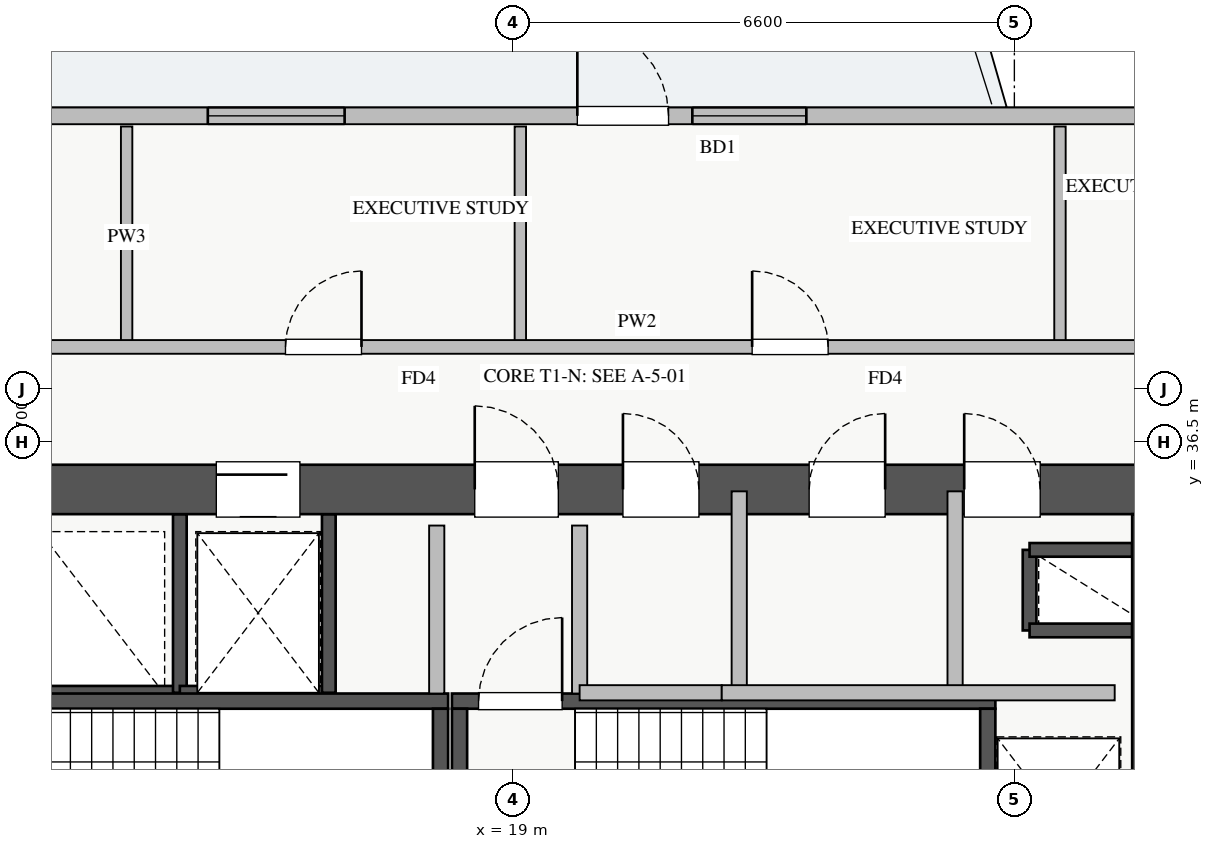
"""IFC4 building model, lengths in metres.
Left out: names, types, materials, properties, quantities, classifications, styles, units other than length and angle.
Written with IfcOpenShell. Run it as: python <this file> out.ifc"""

import sys

from ifc_helpers import new_model, si_unit, direction, frame, frame_2d, origin, place, context, subcontext, project, spatial, rectangle, extrude, source, transform, mapped, element, fill, save


model = new_model("IFC4")
c1 = context("Model", 3, precision=1e-05, world=origin(), true_north=direction((0.0, 1.0)))
c2 = subcontext(c1, "Body", "Model", "MODEL_VIEW")
j1 = project(units=[si_unit("LENGTHUNIT", "METRE"), si_unit("PLANEANGLEUNIT", "RADIAN")], contexts=[c1])
p1 = place(None, origin())
s1 = spatial("IfcSite", under=j1, at=p1, CompositionType="ELEMENT")
p2 = place(p1, origin())
s2 = spatial("IfcBuilding", under=s1, at=p2, CompositionType="ELEMENT")
p3 = place(p2, frame((0.0, 0.0, 119.75)))
s3 = spatial("IfcBuildingStorey", under=s2, at=p3, CompositionType="ELEMENT", Elevation=119.75)
p4 = place(p3, frame((12.68, 33.2, 0.0), z_axis=(0.0, 0.0, 1.0), x_axis=(1.0, 0.0, 0.0)))
e1 = element("IfcWall", 1, at=p4, inside=s3, PredefinedType="SHEAR", context=c2, shape_type="SweptSolid", body=[
    extrude(rectangle(XDim=1.94, YDim=0.18, at=frame_2d((0.97, 0.0))), origin(), (0.0, 0.0, 1.0), 3.07),
])
p5 = place(p3, frame((14.62, 33.2, 0.0), z_axis=(0.0, 0.0, 1.0), x_axis=(0.0, 1.0, 0.0)))
e2 = element("IfcWall", 2, at=p5, inside=s3, PredefinedType="SHEAR", context=c2, shape_type="SweptSolid", body=[
    extrude(rectangle(XDim=2.35, YDim=0.18, at=frame_2d((1.175, 0.0))), origin(), (0.0, 0.0, 1.0), 3.07),
])
p6 = place(p3, frame((25.8, 34.02, 0.0), z_axis=(0.0, 0.0, 1.0), x_axis=(0.0, 1.0, 0.0)))
e3 = element("IfcWall", 3, at=p6, inside=s3, PredefinedType="SHEAR", context=c2, shape_type="SweptSolid", body=[
    extrude(rectangle(XDim=1.06, YDim=0.18, at=frame_2d((0.53, 0.0))), origin(), (0.0, 0.0, 1.0), 3.07),
])
for number, where, z_axis, x_axis in (
    (4, (25.8, 35.08, 0.0), (0.0, 0.0, 1.0), (1.0, 0.0, 0.0)),
    (5, (25.8, 34.02, 0.0), (0.0, 0.0, 1.0), (1.0, 0.0, 0.0)),
):
    element("IfcWall", number, at=place(p3, frame(where, z_axis=z_axis, x_axis=x_axis)), inside=s3, PredefinedType="SHEAR", context=c2, shape_type="SweptSolid", body=[
        extrude(rectangle(XDim=1.35, YDim=0.18, at=frame_2d((0.675, 0.0))), origin(), (0.0, 0.0, 1.0), 3.07),
    ])
p7 = place(p3, frame((14.62, 33.2, 0.0), z_axis=(0.0, 0.0, 1.0), x_axis=(1.0, 0.0, 0.0)))
e6 = element("IfcWall", 6, at=p7, inside=s3, PredefinedType="SHEAR", context=c2, shape_type="SweptSolid", body=[
    extrude(rectangle(XDim=1.96, YDim=0.18, at=frame_2d((0.98, 0.0))), origin(), (0.0, 0.0, 1.0), 3.07),
])
p8 = place(p3, frame((16.58, 33.2, 0.0), z_axis=(0.0, 0.0, 1.0), x_axis=(0.0, 1.0, 0.0)))
e7 = element("IfcWall", 7, at=p8, inside=s3, PredefinedType="SHEAR", context=c2, shape_type="SweptSolid", body=[
    extrude(rectangle(XDim=2.35, YDim=0.18, at=frame_2d((1.175, 0.0))), origin(), (0.0, 0.0, 1.0), 3.07),
])
p9 = place(p3, frame((10.85, 33.09, 0.0), z_axis=(0.0, 0.0, 1.0), x_axis=(1.0, 0.0, 0.0)))
e8 = element("IfcWall", 8, at=p9, inside=s3, PredefinedType="SHEAR", context=c2, shape_type="SweptSolid", body=[
    extrude(rectangle(XDim=7.3, YDim=0.2, at=frame_2d((3.65, 0.0))), origin(), (0.0, 0.0, 1.0), 3.25),
])
p10 = place(p9, frame((0.35, 0.0, 0.0)))
e9 = element("IfcOpeningElement", 9, at=p10, cuts=e8, PredefinedType="OPENING", context=c2, shape_type="SweptSolid", body=[
    extrude(rectangle(XDim=1.1, YDim=2.05, at=frame_2d((0.55, 1.025))), frame((0.0, 0.11, 0.0), z_axis=(0.0, -1.0, 0.0), x_axis=(1.0, 0.0, 0.0)), (0.0, 0.0, 1.0), 0.22),
])
p11 = place(p3, frame((18.05, 30.05, 0.0), z_axis=(0.0, 0.0, 1.0), x_axis=(0.0, 1.0, 0.0)))
e10 = element("IfcWall", 10, at=p11, inside=s3, PredefinedType="SHEAR", context=c2, shape_type="SweptSolid", body=[
    extrude(rectangle(XDim=2.94, YDim=0.2, at=frame_2d((1.47, 0.0))), origin(), (0.0, 0.0, 1.0), 3.25),
])
p12 = place(p3, frame((18.2, 33.09, 0.0), z_axis=(0.0, 0.0, 1.0), x_axis=(1.0, 0.0, 0.0)))
e11 = element("IfcWall", 11, at=p12, inside=s3, PredefinedType="SHEAR", context=c2, shape_type="SweptSolid", body=[
    extrude(rectangle(XDim=7.15, YDim=0.2, at=frame_2d((3.575, 0.0))), origin(), (0.0, 0.0, 1.0), 3.25),
])
p13 = place(p12, frame((0.35, 0.0, 0.0)))
e12 = element("IfcOpeningElement", 12, at=p13, cuts=e11, PredefinedType="OPENING", context=c2, shape_type="SweptSolid", body=[
    extrude(rectangle(XDim=1.1, YDim=2.05, at=frame_2d((0.55, 1.025))), frame((0.0, 0.11, 0.0), z_axis=(0.0, -1.0, 0.0), x_axis=(1.0, 0.0, 0.0)), (0.0, 0.0, 1.0), 0.22),
])
for number, where, z_axis, x_axis in (
    (13, (18.3, 30.05, 0.0), (0.0, 0.0, 1.0), (0.0, 1.0, 0.0)),
    (14, (25.25, 30.05, 0.0), (0.0, 0.0, 1.0), (0.0, 1.0, 0.0)),
):
    element("IfcWall", number, at=place(p3, frame(where, z_axis=z_axis, x_axis=x_axis)), inside=s3, PredefinedType="SHEAR", context=c2, shape_type="SweptSolid", body=[
        extrude(rectangle(XDim=2.94, YDim=0.2, at=frame_2d((1.47, 0.0))), origin(), (0.0, 0.0, 1.0), 3.25),
    ])
p14 = place(p3, frame((10.2, 35.875, 0.0), z_axis=(0.0, 0.0, 1.0), x_axis=(1.0, 0.0, 0.0)))
e15 = element("IfcWall", 15, at=p14, inside=s3, PredefinedType="SHEAR", context=c2, shape_type="SweptSolid", body=[
    extrude(rectangle(XDim=17.6, YDim=0.65, at=frame_2d((8.8, 0.0))), origin(), (0.0, 0.0, 1.0), 3.25),
])
p15 = place(p14, frame((1.15, 0.0, 0.0)))
e16 = element("IfcOpeningElement", 16, at=p15, cuts=e15, PredefinedType="OPENING", context=c2, shape_type="SweptSolid", body=[
    extrude(rectangle(XDim=1.1, YDim=2.05, at=frame_2d((0.55, 1.025))), frame((0.0, 0.335, 0.0), z_axis=(0.0, -1.0, 0.0), x_axis=(1.0, 0.0, 0.0)), (0.0, 0.0, 1.0), 0.67),
])
p16 = place(p14, frame((8.3, 0.0, 0.0)))
e17 = element("IfcOpeningElement", 17, at=p16, cuts=e15, PredefinedType="OPENING", context=c2, shape_type="SweptSolid", body=[
    extrude(rectangle(XDim=1.1, YDim=2.05, at=frame_2d((0.55, 1.025))), frame((0.0, 0.335, 0.0), z_axis=(0.0, -1.0, 0.0), x_axis=(1.0, 0.0, 0.0)), (0.0, 0.0, 1.0), 0.67),
])
p17 = place(p14, frame((4.9, 0.0, 0.0)))
e18 = element("IfcOpeningElement", 18, at=p17, cuts=e15, PredefinedType="OPENING", context=c2, shape_type="SweptSolid", body=[
    extrude(rectangle(XDim=1.1, YDim=2.05, at=frame_2d((0.55, 1.025))), frame((0.0, 0.335, 0.0), z_axis=(0.0, -1.0, 0.0), x_axis=(1.0, 0.0, 0.0)), (0.0, 0.0, 1.0), 0.67),
])
p18 = place(p14, frame((14.74, 0.0, 0.0)))
e19 = element("IfcOpeningElement", 19, at=p18, cuts=e15, PredefinedType="OPENING", context=c2, shape_type="SweptSolid", body=[
    extrude(rectangle(XDim=1.0, YDim=2.05, at=frame_2d((0.5, 1.025))), frame((0.0, 0.335, 0.0), z_axis=(0.0, -1.0, 0.0), x_axis=(1.0, 0.0, 0.0)), (0.0, 0.0, 1.0), 0.67),
])
p19 = place(p14, frame((10.25, 0.0, 0.0)))
e20 = element("IfcOpeningElement", 20, at=p19, cuts=e15, PredefinedType="OPENING", context=c2, shape_type="SweptSolid", body=[
    extrude(rectangle(XDim=1.0, YDim=2.05, at=frame_2d((0.5, 1.025))), frame((0.0, 0.335, 0.0), z_axis=(0.0, -1.0, 0.0), x_axis=(1.0, 0.0, 0.0)), (0.0, 0.0, 1.0), 0.67),
])
p20 = place(p14, frame((12.7, 0.0, 0.0)))
e21 = element("IfcOpeningElement", 21, at=p20, cuts=e15, PredefinedType="OPENING", context=c2, shape_type="SweptSolid", body=[
    extrude(rectangle(XDim=1.0, YDim=2.05, at=frame_2d((0.5, 1.025))), frame((0.0, 0.335, 0.0), z_axis=(0.0, -1.0, 0.0), x_axis=(1.0, 0.0, 0.0)), (0.0, 0.0, 1.0), 0.67),
])
p21 = place(p3, frame((27.475, 29.65, 0.0), z_axis=(0.0, 0.0, 1.0), x_axis=(0.0, 1.0, 0.0)))
e22 = element("IfcWall", 22, at=p21, inside=s3, PredefinedType="SHEAR", context=c2, shape_type="SweptSolid", body=[
    extrude(rectangle(XDim=5.9, YDim=0.65, at=frame_2d((2.95, 0.0))), origin(), (0.0, 0.0, 1.0), 3.25),
])
p22 = place(p21, frame((1.1, 0.0, 0.0)))
e23 = element("IfcOpeningElement", 23, at=p22, cuts=e22, PredefinedType="OPENING", context=c2, shape_type="SweptSolid", body=[
    extrude(rectangle(XDim=1.3, YDim=2.05, at=frame_2d((0.65, 1.025))), frame((0.0, 0.335, 0.0), z_axis=(0.0, -1.0, 0.0), x_axis=(1.0, 0.0, 0.0)), (0.0, 0.0, 1.0), 0.67),
])
p23 = place(p3, frame((6.55, 40.79, 0.0), z_axis=(0.0, 0.0, 1.0), x_axis=(1.0, 0.0, 0.0)))
e24 = element("IfcWall", 24, at=p23, inside=s3, PredefinedType="STANDARD", context=c2, shape_type="SweptSolid", body=[
    extrude(rectangle(XDim=24.9, YDim=0.22, at=frame_2d((12.45, 0.0))), origin(), (0.0, 0.0, 1.0), 2.61),
])
p24 = place(p23, frame((13.3, 0.0, 0.0)))
e25 = element("IfcOpeningElement", 25, at=p24, cuts=e24, PredefinedType="OPENING", context=c2, shape_type="SweptSolid", body=[
    extrude(rectangle(XDim=1.2, YDim=2.1, at=frame_2d((0.6, 1.05))), frame((0.0, 0.12, 0.0), z_axis=(0.0, -1.0, 0.0), x_axis=(1.0, 0.0, 0.0)), (0.0, 0.0, 1.0), 0.24),
])
p25 = place(p23, frame((3.635, 0.0, 0.9)))
e26 = element("IfcOpeningElement", 26, at=p25, cuts=e24, PredefinedType="OPENING", context=c2, shape_type="SweptSolid", body=[
    extrude(rectangle(XDim=2.4, YDim=1.5, at=frame_2d((1.2, 0.75))), frame((0.0, 0.12, 0.0), z_axis=(0.0, -1.0, 0.0), x_axis=(1.0, 0.0, 0.0)), (0.0, 0.0, 1.0), 0.24),
])
p26 = place(p23, frame((8.438, 0.0, 0.9)))
e27 = element("IfcOpeningElement", 27, at=p26, cuts=e24, PredefinedType="OPENING", context=c2, shape_type="SweptSolid", body=[
    extrude(rectangle(XDim=1.8, YDim=1.45, at=frame_2d((0.9, 0.725))), frame((0.0, 0.12, 0.0), z_axis=(0.0, -1.0, 0.0), x_axis=(1.0, 0.0, 0.0)), (0.0, 0.0, 1.0), 0.24),
])
p27 = place(p23, frame((14.813, 0.0, 0.9)))
e28 = element("IfcOpeningElement", 28, at=p27, cuts=e24, PredefinedType="OPENING", context=c2, shape_type="SweptSolid", body=[
    extrude(rectangle(XDim=1.5, YDim=1.45, at=frame_2d((0.75, 0.725))), frame((0.0, 0.12, 0.0), z_axis=(0.0, -1.0, 0.0), x_axis=(1.0, 0.0, 0.0)), (0.0, 0.0, 1.0), 0.24),
])
p28 = place(p23, frame((20.738, 0.0, 0.9)))
e29 = element("IfcOpeningElement", 29, at=p28, cuts=e24, PredefinedType="OPENING", context=c2, shape_type="SweptSolid", body=[
    extrude(rectangle(XDim=2.1, YDim=1.48, at=frame_2d((1.05, 0.74))), frame((0.0, 0.12, 0.0), z_axis=(0.0, -1.0, 0.0), x_axis=(1.0, 0.0, 0.0)), (0.0, 0.0, 1.0), 0.24),
])
p29 = place(p23, frame((0.258, 0.0, 0.9)))
e30 = element("IfcOpeningElement", 30, at=p29, cuts=e24, PredefinedType="OPENING", context=c2, shape_type="SweptSolid", body=[
    extrude(rectangle(XDim=1.8, YDim=1.5, at=frame_2d((0.9, 0.75))), frame((0.0, 0.12, 0.0), z_axis=(0.0, -1.0, 0.0), x_axis=(1.0, 0.0, 0.0)), (0.0, 0.0, 1.0), 0.24),
])
for number, where, z_axis, x_axis in (
    (31, (18.0, 33.19, 0.0), (0.0, 0.0, 1.0), (0.0, 1.0, 0.0)),
    (32, (19.88, 33.19, 0.0), (0.0, 0.0, 1.0), (0.0, 1.0, 0.0)),
):
    element("IfcWall", number, at=place(p3, frame(where, z_axis=z_axis, x_axis=x_axis)), inside=s3, PredefinedType="PARTITIONING", context=c2, shape_type="SweptSolid", body=[
        extrude(rectangle(XDim=2.21, YDim=0.2, at=frame_2d((1.105, 0.0))), origin(), (0.0, 0.0, 1.0), 3.07),
    ])
p30 = place(p3, frame((24.82, 33.2, 0.0), z_axis=(0.0, 0.0, 1.0), x_axis=(0.0, 1.0, 0.0)))
e33 = element("IfcWall", 33, at=p30, inside=s3, PredefinedType="PARTITIONING", context=c2, shape_type="SweptSolid", body=[
    extrude(rectangle(XDim=2.65, YDim=0.2, at=frame_2d((1.325, 0.0))), origin(), (0.0, 0.0, 1.0), 3.07),
])
p31 = place(p3, frame((19.88, 33.2, 0.0), z_axis=(0.0, 0.0, 1.0), x_axis=(1.0, 0.0, 0.0)))
e34 = element("IfcWall", 34, at=p31, inside=s3, PredefinedType="PARTITIONING", context=c2, shape_type="SweptSolid", body=[
    extrude(rectangle(XDim=1.87, YDim=0.2, at=frame_2d((0.935, 0.0))), origin(), (0.0, 0.0, 1.0), 3.07),
])
p32 = place(p3, frame((21.98, 33.2, 0.0), z_axis=(0.0, 0.0, 1.0), x_axis=(0.0, 1.0, 0.0)))
e35 = element("IfcWall", 35, at=p32, inside=s3, PredefinedType="PARTITIONING", context=c2, shape_type="SweptSolid", body=[
    extrude(rectangle(XDim=2.65, YDim=0.2, at=frame_2d((1.325, 0.0))), origin(), (0.0, 0.0, 1.0), 3.07),
])
p33 = place(p3, frame((21.75, 33.2, 0.0), z_axis=(0.0, 0.0, 1.0), x_axis=(1.0, 0.0, 0.0)))
e36 = element("IfcWall", 36, at=p33, inside=s3, PredefinedType="PARTITIONING", context=c2, shape_type="SweptSolid", body=[
    extrude(rectangle(XDim=5.17, YDim=0.2, at=frame_2d((2.585, 0.0))), origin(), (0.0, 0.0, 1.0), 3.07),
])
p34 = place(p3, frame((13.92, 37.75, 0.0), z_axis=(0.0, 0.0, 1.0), x_axis=(0.0, 1.0, 0.0)))
e37 = element("IfcWall", 37, at=p34, inside=s3, PredefinedType="PARTITIONING", context=c2, shape_type="SweptSolid", body=[
    extrude(rectangle(XDim=2.9, YDim=0.15, at=frame_2d((1.45, 0.0))), origin(), (0.0, 0.0, 1.0), 3.07),
])
p35 = place(p3, frame((19.1, 37.75, 0.0), z_axis=(0.0, 0.0, 1.0), x_axis=(0.0, 1.0, 0.0)))
e38 = element("IfcWall", 38, at=p35, inside=s3, PredefinedType="PARTITIONING", context=c2, shape_type="SweptSolid", body=[
    extrude(rectangle(XDim=2.9, YDim=0.15, at=frame_2d((1.45, 0.0))), origin(), (0.0, 0.0, 1.0), 2.821),
])
p36 = place(p3, frame((26.2, 37.75, 0.0), z_axis=(0.0, 0.0, 1.0), x_axis=(0.0, 1.0, 0.0)))
e39 = element("IfcWall", 39, at=p36, inside=s3, PredefinedType="PARTITIONING", context=c2, shape_type="SweptSolid", body=[
    extrude(rectangle(XDim=2.9, YDim=0.15, at=frame_2d((1.45, 0.0))), origin(), (0.0, 0.0, 1.0), 3.07),
])
p37 = place(p3, frame((8.85, 37.75, 0.0), z_axis=(0.0, 0.0, 1.0), x_axis=(1.0, 0.0, 0.0)))
e40 = element("IfcWall", 40, at=p37, inside=s3, PredefinedType="PARTITIONING", context=c2, shape_type="SweptSolid", body=[
    extrude(rectangle(XDim=23.57, YDim=0.18, at=frame_2d((11.785, 0.0))), origin(), (0.0, 0.0, 1.0), 3.07),
])
p38 = place(p37, frame((2.035, 0.0, 0.0)))
e41 = element("IfcOpeningElement", 41, at=p38, cuts=e40, PredefinedType="OPENING", context=c2, shape_type="SweptSolid", body=[
    extrude(rectangle(XDim=1.0, YDim=2.05, at=frame_2d((0.5, 1.025))), frame((0.0, 0.1, 0.0), z_axis=(0.0, -1.0, 0.0), x_axis=(1.0, 0.0, 0.0)), (0.0, 0.0, 1.0), 0.2),
])
p39 = place(p37, frame((7.16, 0.0, 0.0)))
e42 = element("IfcOpeningElement", 42, at=p39, cuts=e40, PredefinedType="OPENING", context=c2, shape_type="SweptSolid", body=[
    extrude(rectangle(XDim=1.0, YDim=2.05, at=frame_2d((0.5, 1.025))), frame((0.0, 0.1, 0.0), z_axis=(0.0, -1.0, 0.0), x_axis=(1.0, 0.0, 0.0)), (0.0, 0.0, 1.0), 0.2),
])
p40 = place(p37, frame((13.3, 0.0, 0.0)))
e43 = element("IfcOpeningElement", 43, at=p40, cuts=e40, PredefinedType="OPENING", context=c2, shape_type="SweptSolid", body=[
    extrude(rectangle(XDim=1.0, YDim=2.05, at=frame_2d((0.5, 1.025))), frame((0.0, 0.1, 0.0), z_axis=(0.0, -1.0, 0.0), x_axis=(1.0, 0.0, 0.0)), (0.0, 0.0, 1.0), 0.2),
])
p41 = place(p37, frame((19.74, 0.0, 0.0)))
e44 = element("IfcOpeningElement", 44, at=p41, cuts=e40, PredefinedType="OPENING", context=c2, shape_type="SweptSolid", body=[
    extrude(rectangle(XDim=1.0, YDim=2.05, at=frame_2d((0.5, 1.025))), frame((0.0, 0.1, 0.0), z_axis=(0.0, -1.0, 0.0), x_axis=(1.0, 0.0, 0.0)), (0.0, 0.0, 1.0), 0.2),
])
m1 = source(origin(), c2, "Body", "SweptSolid", [
    extrude(rectangle(XDim=1.2, YDim=2.1, at=frame_2d((0.6, 1.05))), frame((0.0, 0.025, 0.0), z_axis=(0.0, -1.0, 0.0), x_axis=(1.0, 0.0, 0.0)), (0.0, 0.0, 1.0), 0.05),
])
p42 = place(p24, origin())
e45 = element("IfcDoor", 45, at=p42, inside=s3, OperationType="SINGLE_SWING_LEFT", PredefinedType="DOOR", context=c2, shape_type="MappedRepresentation", body=[
    mapped(m1, transform((0.0, 0.0, 0.0), x_axis=(1.0, 0.0, 0.0), y_axis=(0.0, 1.0, 0.0), z_axis=(0.0, 0.0, 1.0), scale=1.0)),
])
fill(e25, e45)
m2 = source(origin(), c2, "Body", "SweptSolid", [
    extrude(rectangle(XDim=1.8, YDim=1.45, at=frame_2d((0.9, 0.725))), frame((0.0, 0.03, 0.0), z_axis=(0.0, -1.0, 0.0), x_axis=(1.0, 0.0, 0.0)), (0.0, 0.0, 1.0), 0.06),
])
p43 = place(p26, origin())
e46 = element("IfcWindow", 46, at=p43, inside=s3, PartitioningType="DOUBLE_PANEL_VERTICAL", PredefinedType="WINDOW", context=c2, shape_type="MappedRepresentation", body=[
    mapped(m2, transform((0.0, 0.0, 0.0), x_axis=(1.0, 0.0, 0.0), y_axis=(0.0, 1.0, 0.0), z_axis=(0.0, 0.0, 1.0), scale=1.0)),
])
fill(e27, e46)
m3 = source(origin(), c2, "Body", "SweptSolid", [
    extrude(rectangle(XDim=1.5, YDim=1.45, at=frame_2d((0.75, 0.725))), frame((0.0, 0.03, 0.0), z_axis=(0.0, -1.0, 0.0), x_axis=(1.0, 0.0, 0.0)), (0.0, 0.0, 1.0), 0.06),
])
p44 = place(p27, origin())
e47 = element("IfcWindow", 47, at=p44, inside=s3, PartitioningType="DOUBLE_PANEL_VERTICAL", PredefinedType="WINDOW", context=c2, shape_type="MappedRepresentation", body=[
    mapped(m3, transform((0.0, 0.0, 0.0), x_axis=(1.0, 0.0, 0.0), y_axis=(0.0, 1.0, 0.0), z_axis=(0.0, 0.0, 1.0), scale=1.0)),
])
fill(e28, e47)
m4 = source(origin(), c2, "Body", "SweptSolid", [
    extrude(rectangle(XDim=1.1, YDim=2.05, at=frame_2d((0.55, 1.025))), frame((0.0, 0.025, 0.0), z_axis=(0.0, -1.0, 0.0), x_axis=(1.0, 0.0, 0.0)), (0.0, 0.0, 1.0), 0.05),
])
p45 = place(p16, origin())
e48 = element("IfcDoor", 48, at=p45, inside=s3, OperationType="SINGLE_SWING_LEFT", PredefinedType="DOOR", context=c2, shape_type="MappedRepresentation", body=[
    mapped(m4, transform((0.0, 0.0, 0.0), x_axis=(1.0, 0.0, 0.0), y_axis=(0.0, 1.0, 0.0), z_axis=(0.0, 0.0, 1.0), scale=1.0)),
])
fill(e17, e48)
p46 = place(p13, origin())
e49 = element("IfcDoor", 49, at=p46, inside=s3, OperationType="SINGLE_SWING_RIGHT", PredefinedType="DOOR", context=c2, shape_type="MappedRepresentation", body=[
    mapped(m4, transform((0.0, 0.0, 0.0), x_axis=(1.0, 0.0, 0.0), y_axis=(0.0, 1.0, 0.0), z_axis=(0.0, 0.0, 1.0), scale=1.0)),
])
fill(e12, e49)
p47 = place(p17, origin())
e50 = element("IfcDoor", 50, at=p47, inside=s3, OperationType="SLIDING_TO_LEFT", PredefinedType="DOOR", context=c2, shape_type="MappedRepresentation", body=[
    mapped(m4, transform((0.0, 0.0, 0.0), x_axis=(1.0, 0.0, 0.0), y_axis=(0.0, 1.0, 0.0), z_axis=(0.0, 0.0, 1.0), scale=1.0)),
])
fill(e18, e50)
m5 = source(origin(), c2, "Body", "SweptSolid", [
    extrude(rectangle(XDim=1.0, YDim=2.05, at=frame_2d((0.5, 1.025))), frame((0.0, 0.025, 0.0), z_axis=(0.0, -1.0, 0.0), x_axis=(1.0, 0.0, 0.0)), (0.0, 0.0, 1.0), 0.05),
])
p48 = place(p18, origin())
e51 = element("IfcDoor", 51, at=p48, inside=s3, OperationType="SINGLE_SWING_LEFT", PredefinedType="DOOR", context=c2, shape_type="MappedRepresentation", body=[
    mapped(m5, transform((0.0, 0.0, 0.0), x_axis=(1.0, 0.0, 0.0), y_axis=(0.0, 1.0, 0.0), z_axis=(0.0, 0.0, 1.0), scale=1.0)),
])
fill(e19, e51)
p49 = place(p19, origin())
e52 = element("IfcDoor", 52, at=p49, inside=s3, OperationType="SINGLE_SWING_LEFT", PredefinedType="DOOR", context=c2, shape_type="MappedRepresentation", body=[
    mapped(m5, transform((0.0, 0.0, 0.0), x_axis=(1.0, 0.0, 0.0), y_axis=(0.0, 1.0, 0.0), z_axis=(0.0, 0.0, 1.0), scale=1.0)),
])
fill(e20, e52)
p50 = place(p20, origin())
e53 = element("IfcDoor", 53, at=p50, inside=s3, OperationType="SINGLE_SWING_RIGHT", PredefinedType="DOOR", context=c2, shape_type="MappedRepresentation", body=[
    mapped(m5, transform((0.0, 0.0, 0.0), x_axis=(1.0, 0.0, 0.0), y_axis=(0.0, 1.0, 0.0), z_axis=(0.0, 0.0, 1.0), scale=1.0)),
])
fill(e21, e53)
p51 = place(p39, origin())
e54 = element("IfcDoor", 54, at=p51, inside=s3, OperationType="SINGLE_SWING_RIGHT", PredefinedType="DOOR", context=c2, shape_type="MappedRepresentation", body=[
    mapped(m5, transform((0.0, 0.0, 0.0), x_axis=(1.0, 0.0, 0.0), y_axis=(0.0, 1.0, 0.0), z_axis=(0.0, 0.0, 1.0), scale=1.0)),
])
fill(e42, e54)
p52 = place(p40, origin())
e55 = element("IfcDoor", 55, at=p52, inside=s3, OperationType="SINGLE_SWING_LEFT", PredefinedType="DOOR", context=c2, shape_type="MappedRepresentation", body=[
    mapped(m5, transform((0.0, 0.0, 0.0), x_axis=(1.0, 0.0, 0.0), y_axis=(0.0, 1.0, 0.0), z_axis=(0.0, 0.0, 1.0), scale=1.0)),
])
fill(e43, e55)
save(model, sys.argv[1])
